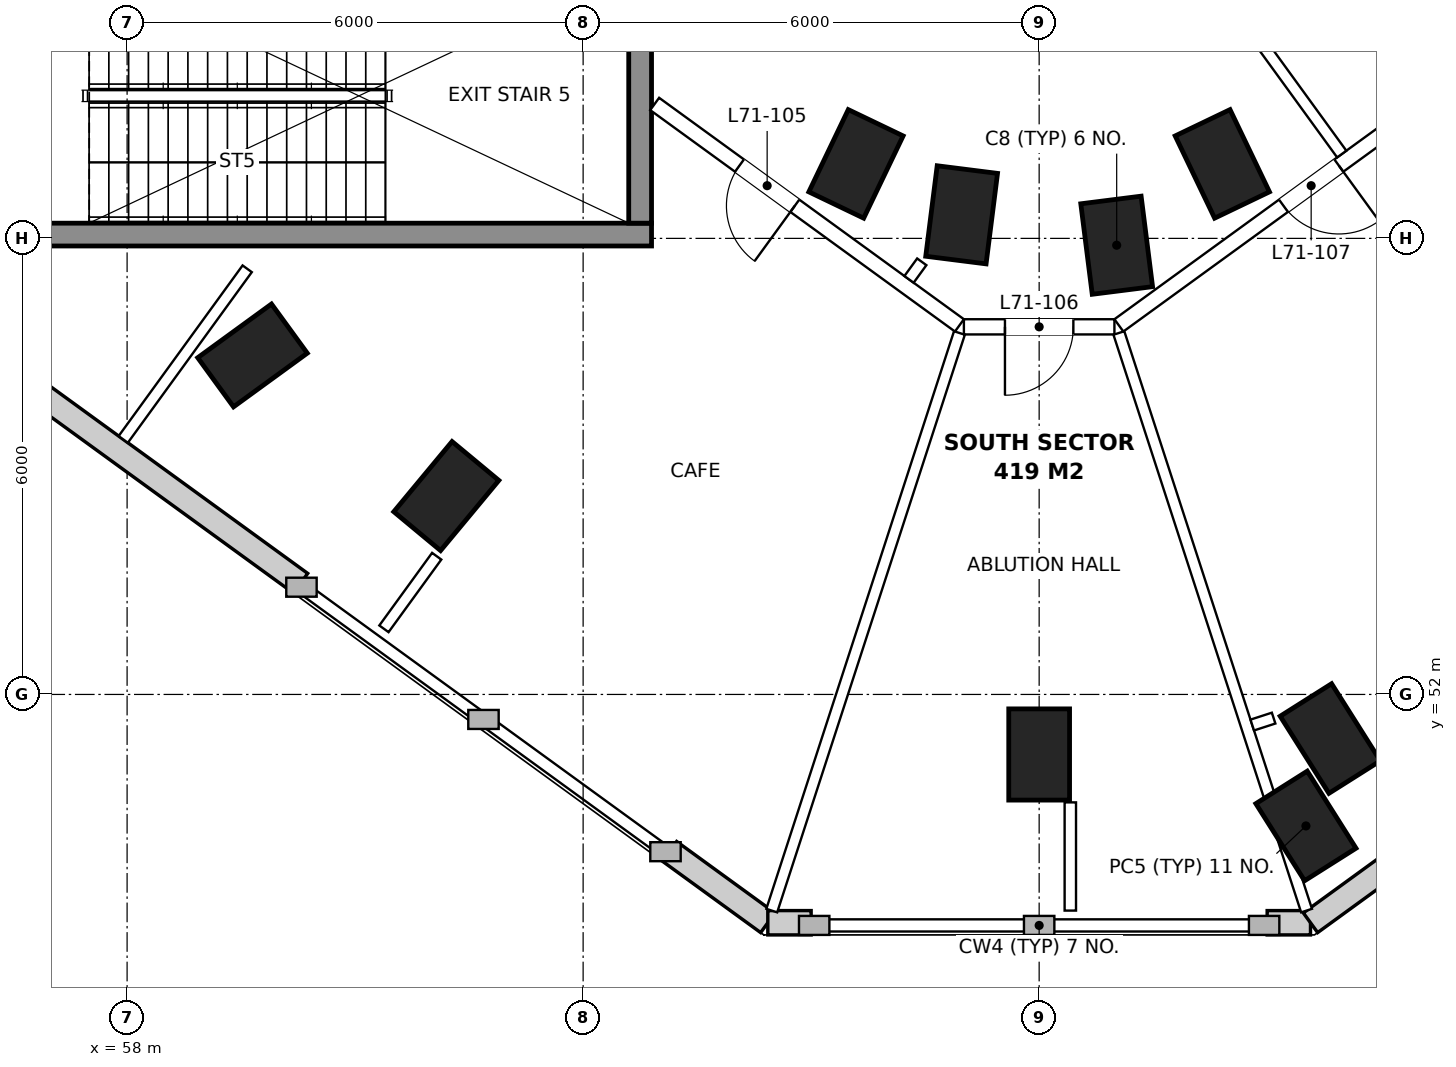
"""IFC4 building model, lengths in metres.
Left out: names, types, materials, properties, quantities, classifications, styles, units other than length and angle.
Written with IfcOpenShell. Run it as: python <this file> out.ifc"""

import sys

from ifc_helpers import new_model, si_unit, direction, frame, frame_2d, origin, origin_2d, place, context, subcontext, project, spatial, rectangle, extrude, element, fill, save


model = new_model("IFC4")
c1 = context("Model", 3, precision=1e-05, world=origin(), true_north=direction((0.0, 1.0)))
c2 = subcontext(c1, "Body", "Model", "MODEL_VIEW")
j1 = project(units=[si_unit("LENGTHUNIT", "METRE"), si_unit("PLANEANGLEUNIT", "RADIAN")], contexts=[c1])
p1 = place(None, origin())
s1 = spatial("IfcSite", under=j1, at=p1, CompositionType="ELEMENT")
p2 = place(p1, origin())
s2 = spatial("IfcBuilding", under=s1, at=p2, CompositionType="ELEMENT")
p3 = place(p2, frame((0.0, 0.0, 300.1)))
s3 = spatial("IfcBuildingStorey", under=s2, at=p3, CompositionType="ELEMENT", Elevation=300.1)
for number, where, z_axis, x_axis in (
    (1, (59.65, 56.46, 0.0), (0.0, 0.0, 1.0), (-0.588, 0.809, 0.0)),
    (2, (62.2, 54.61, 0.0), (0.0, 0.0, 1.0), (-0.769, 0.639, 0.0)),
    (3, (70.0, 51.21, 0.0), (0.0, 0.0, 1.0), (-1.0, 0.0, 0.0)),
    (4, (73.51, 50.27, 0.0), (0.0, 0.0, 1.0), (-0.845, -0.534, 0.0)),
    (5, (73.83, 51.42, 0.0), (0.0, 0.0, 1.0), (-0.845, -0.534, 0.0)),
    (6, (67.59, 58.98, 0.0), (0.0, 0.0, 1.0), (-0.902, 0.432, 0.0)),
    (7, (68.98, 58.31, 0.0), (0.0, 0.0, 1.0), (-0.992, 0.126, 0.0)),
    (8, (71.02, 57.91, 0.0), (0.0, 0.0, 1.0), (-0.992, -0.126, 0.0)),
    (9, (72.41, 58.98, 0.0), (0.0, 0.0, 1.0), (-0.902, -0.432, 0.0)),
):
    element("IfcColumn", number, at=place(p3, frame(where, z_axis=z_axis, x_axis=x_axis)), inside=s3, PredefinedType="COLUMN", context=c2, shape_type="SweptSolid", body=[
        extrude(rectangle(XDim=0.8, YDim=1.2, at=origin_2d()), origin(), (0.0, 0.0, 1.0), 6.0),
    ])
p4 = place(p3, frame((49.281, 61.456, 0.0), z_axis=(0.0, 0.0, 1.0), x_axis=(0.809018581772, -0.587783067422, 0.0)))
e10 = element("IfcWall", 10, at=p4, inside=s3, PredefinedType="SOLIDWALL", context=c2, shape_type="SweptSolid", body=[
    extrude(rectangle(XDim=13.599, YDim=0.32, at=frame_2d((6.799, 0.0))), origin(), (0.0, 0.0, 1.0), 5.7),
])
p5 = place(p3, frame((65.136, 49.936, 0.0), z_axis=(0.0, 0.0, 1.0), x_axis=(0.809033137517, -0.587763032522, 0.0)))
e11 = element("IfcWall", 11, at=p5, inside=s3, PredefinedType="SOLIDWALL", context=c2, shape_type="SweptSolid", body=[
    extrude(rectangle(XDim=1.599, YDim=0.32, at=frame_2d((0.799, 0.0))), origin(), (0.0, 0.0, 1.0), 5.7),
])
for number, where, z_axis, x_axis in (
    (12, (66.43, 48.996, 0.0), (0.0, 0.0, 1.0), (1.0, 0.0, 0.0)),
    (13, (73.0, 48.996, 0.0), (0.0, 0.0, 1.0), (1.0, 0.0, 0.0)),
):
    element("IfcWall", number, at=place(p3, frame(where, z_axis=z_axis, x_axis=x_axis)), inside=s3, PredefinedType="SOLIDWALL", context=c2, shape_type="SweptSolid", body=[
        extrude(rectangle(XDim=0.57, YDim=0.32, at=frame_2d((0.285, 0.0))), origin(), (0.0, 0.0, 1.0), 5.7),
    ])
p6 = place(p3, frame((73.57, 48.996, 0.0), z_axis=(0.0, 0.0, 1.0), x_axis=(0.809033137517, 0.587763032522, 0.0)))
e14 = element("IfcWall", 14, at=p6, inside=s3, PredefinedType="SOLIDWALL", context=c2, shape_type="SweptSolid", body=[
    extrude(rectangle(XDim=1.599, YDim=0.32, at=frame_2d((0.799, 0.0))), origin(), (0.0, 0.0, 1.0), 5.7),
])
p7 = place(p3, frame((53.903, 58.05, 0.0), z_axis=(0.0, 0.0, 1.0), x_axis=(1.0, 0.0, 0.0)))
e15 = element("IfcWall", 15, at=p7, inside=s3, PredefinedType="SHEAR", context=c2, shape_type="SweptSolid", body=[
    extrude(rectangle(XDim=10.997, YDim=0.3, at=frame_2d((5.499, 0.0))), origin(), (0.0, 0.0, 1.0), 6.0),
])
p8 = place(p3, frame((64.75, 58.2, 0.0), z_axis=(0.0, 0.0, 1.0), x_axis=(0.0, 1.0, 0.0)))
e16 = element("IfcWall", 16, at=p8, inside=s3, PredefinedType="SHEAR", context=c2, shape_type="SweptSolid", body=[
    extrude(rectangle(XDim=3.35, YDim=0.3, at=frame_2d((1.675, 0.0))), origin(), (0.0, 0.0, 1.0), 6.0),
])
p9 = place(p3, frame((75.059, 59.769, 0.0), z_axis=(0.0, 0.0, 1.0), x_axis=(-0.809010774922, -0.587793812539, 0.0)))
e17 = element("IfcWall", 17, at=p9, inside=s3, PredefinedType="PARTITIONING", context=c2, shape_type="SweptSolid", body=[
    extrude(rectangle(XDim=4.956, YDim=0.2, at=frame_2d((2.478, 0.0))), origin(), (0.0, 0.0, 1.0), 5.2),
])
p10 = place(p9, frame((1.379, 0.0, 0.0)))
e18 = element("IfcOpeningElement", 18, at=p10, cuts=e17, PredefinedType="OPENING", context=c2, shape_type="SweptSolid", body=[
    extrude(rectangle(XDim=0.9, YDim=2.1, at=frame_2d((0.45, 1.05))), frame((0.0, 0.11, 0.0), z_axis=(0.0, -1.0, 0.0), x_axis=(1.0, 0.0, 0.0)), (0.0, 0.0, 1.0), 0.22),
])
p11 = place(p3, frame((70.99, 56.836, 0.0), z_axis=(0.0, 0.0, 1.0), x_axis=(-1.0, 0.0, 0.0)))
e19 = element("IfcWall", 19, at=p11, inside=s3, PredefinedType="PARTITIONING", context=c2, shape_type="SweptSolid", body=[
    extrude(rectangle(XDim=1.98, YDim=0.2, at=frame_2d((0.99, 0.0))), origin(), (0.0, 0.0, 1.0), 5.7),
])
p12 = place(p11, frame((0.54, 0.0, 0.0)))
e20 = element("IfcOpeningElement", 20, at=p12, cuts=e19, PredefinedType="OPENING", context=c2, shape_type="SweptSolid", body=[
    extrude(rectangle(XDim=0.9, YDim=2.1, at=frame_2d((0.45, 1.05))), frame((0.0, 0.11, 0.0), z_axis=(0.0, -1.0, 0.0), x_axis=(1.0, 0.0, 0.0)), (0.0, 0.0, 1.0), 0.22),
])
p13 = place(p3, frame((68.951, 56.855, 0.0), z_axis=(0.0, 0.0, 1.0), x_axis=(-0.809010774922, 0.587793812539, 0.0)))
e21 = element("IfcWall", 21, at=p13, inside=s3, PredefinedType="PARTITIONING", context=c2, shape_type="SweptSolid", body=[
    extrude(rectangle(XDim=4.956, YDim=0.2, at=frame_2d((2.478, 0.0))), origin(), (0.0, 0.0, 1.0), 5.2),
])
p14 = place(p13, frame((2.677, 0.0, 0.0)))
e22 = element("IfcOpeningElement", 22, at=p14, cuts=e21, PredefinedType="OPENING", context=c2, shape_type="SweptSolid", body=[
    extrude(rectangle(XDim=0.9, YDim=2.1, at=frame_2d((0.45, 1.05))), frame((0.0, 0.11, 0.0), z_axis=(0.0, -1.0, 0.0), x_axis=(1.0, 0.0, 0.0)), (0.0, 0.0, 1.0), 0.22),
])
p15 = place(p3, frame((66.482, 49.156, 0.0), z_axis=(0.0, 0.0, 1.0), x_axis=(0.309004544659, 0.951060561363, 0.0)))
e23 = element("IfcWall", 23, at=p15, inside=s3, PredefinedType="PARTITIONING", context=c2, shape_type="SweptSolid", body=[
    extrude(rectangle(XDim=7.99, YDim=0.15, at=frame_2d((3.995, 0.0))), origin(), (0.0, 0.0, 1.0), 5.25),
])
p16 = place(p3, frame((73.518, 49.156, 0.0), z_axis=(0.0, 0.0, 1.0), x_axis=(-0.309004544659, 0.951060561363, 0.0)))
e24 = element("IfcWall", 24, at=p16, inside=s3, PredefinedType="PARTITIONING", context=c2, shape_type="SweptSolid", body=[
    extrude(rectangle(XDim=7.99, YDim=0.15, at=frame_2d((3.995, 0.0))), origin(), (0.0, 0.0, 1.0), 5.7),
])
p17 = place(p3, frame((57.949, 55.355, 0.0), z_axis=(0.0, 0.0, 1.0), x_axis=(0.58773733182, 0.809051808468, 0.0)))
e25 = element("IfcWall", 25, at=p17, inside=s3, PredefinedType="PARTITIONING", context=c2, shape_type="SweptSolid", body=[
    extrude(rectangle(XDim=2.774, YDim=0.15, at=frame_2d((1.387, 0.0))), origin(), (0.0, 0.0, 1.0), 5.7),
])
p18 = place(p3, frame((62.073, 53.819, 0.0), z_axis=(0.0, 0.0, 1.0), x_axis=(-0.587888869684, -0.808941701795, 0.0)))
e26 = element("IfcWall", 26, at=p18, inside=s3, PredefinedType="PARTITIONING", context=c2, shape_type="SweptSolid", body=[
    extrude(rectangle(XDim=1.181, YDim=0.15, at=frame_2d((0.59, 0.0))), origin(), (0.0, 0.0, 1.0), 5.7),
])
p19 = place(p3, frame((70.41, 50.58, 0.0), z_axis=(0.0, 0.0, 1.0), x_axis=(0.0, -1.0, 0.0)))
e27 = element("IfcWall", 27, at=p19, inside=s3, PredefinedType="PARTITIONING", context=c2, shape_type="SweptSolid", body=[
    extrude(rectangle(XDim=1.424, YDim=0.15, at=frame_2d((0.712, 0.0))), origin(), (0.0, 0.0, 1.0), 5.7),
])
p20 = place(p3, frame((73.085, 51.689, 0.0), z_axis=(0.0, 0.0, 1.0), x_axis=(-0.951052283617, -0.309030020915, 0.0)))
e28 = element("IfcWall", 28, at=p20, inside=s3, PredefinedType="PARTITIONING", context=c2, shape_type="SweptSolid", body=[
    extrude(rectangle(XDim=0.295, YDim=0.15, at=frame_2d((0.148, 0.0))), origin(), (0.0, 0.0, 1.0), 5.7),
])
p21 = place(p3, frame((68.456, 57.692, 0.0), z_axis=(0.0, 0.0, 1.0), x_axis=(-0.587612124506, -0.809142750776, 0.0)))
e29 = element("IfcWall", 29, at=p21, inside=s3, PredefinedType="PARTITIONING", context=c2, shape_type="SweptSolid", body=[
    extrude(rectangle(XDim=0.285, YDim=0.15, at=frame_2d((0.143, 0.0))), origin(), (0.0, 0.0, 1.0), 5.7),
])
p22 = place(p3, frame((72.805, 60.729, 0.0), z_axis=(0.0, 0.0, 1.0), x_axis=(0.587830755478, -0.80898393242, 0.0)))
e30 = element("IfcWall", 30, at=p22, inside=s3, PredefinedType="PARTITIONING", context=c2, shape_type="SweptSolid", body=[
    extrude(rectangle(XDim=2.001, YDim=0.15, at=frame_2d((1.001, 0.0))), origin(), (0.0, 0.0, 1.0), 5.7),
])
p23 = place(p14, origin())
e31 = element("IfcDoor", 31, at=p23, inside=s3, OperationType="SINGLE_SWING_LEFT", PredefinedType="DOOR", context=c2, shape_type="SweptSolid", body=[
    extrude(rectangle(XDim=0.9, YDim=2.1, at=frame_2d((0.45, 1.05))), frame((0.0, 0.025, 0.0), z_axis=(0.0, -1.0, 0.0), x_axis=(1.0, 0.0, 0.0)), (0.0, 0.0, 1.0), 0.05),
])
fill(e22, e31)
p24 = place(p12, origin())
e32 = element("IfcDoor", 32, at=p24, inside=s3, OperationType="SINGLE_SWING_RIGHT", PredefinedType="DOOR", context=c2, shape_type="SweptSolid", body=[
    extrude(rectangle(XDim=0.9, YDim=2.1, at=frame_2d((0.45, 1.05))), frame((0.0, 0.025, 0.0), z_axis=(0.0, -1.0, 0.0), x_axis=(1.0, 0.0, 0.0)), (0.0, 0.0, 1.0), 0.05),
])
fill(e20, e32)
p25 = place(p10, origin())
e33 = element("IfcDoor", 33, at=p25, inside=s3, OperationType="SINGLE_SWING_LEFT", PredefinedType="DOOR", context=c2, shape_type="SweptSolid", body=[
    extrude(rectangle(XDim=0.9, YDim=2.1, at=frame_2d((0.45, 1.05))), frame((0.0, 0.025, 0.0), z_axis=(0.0, -1.0, 0.0), x_axis=(1.0, 0.0, 0.0)), (0.0, 0.0, 1.0), 0.05),
])
fill(e18, e33)
save(model, sys.argv[1])
